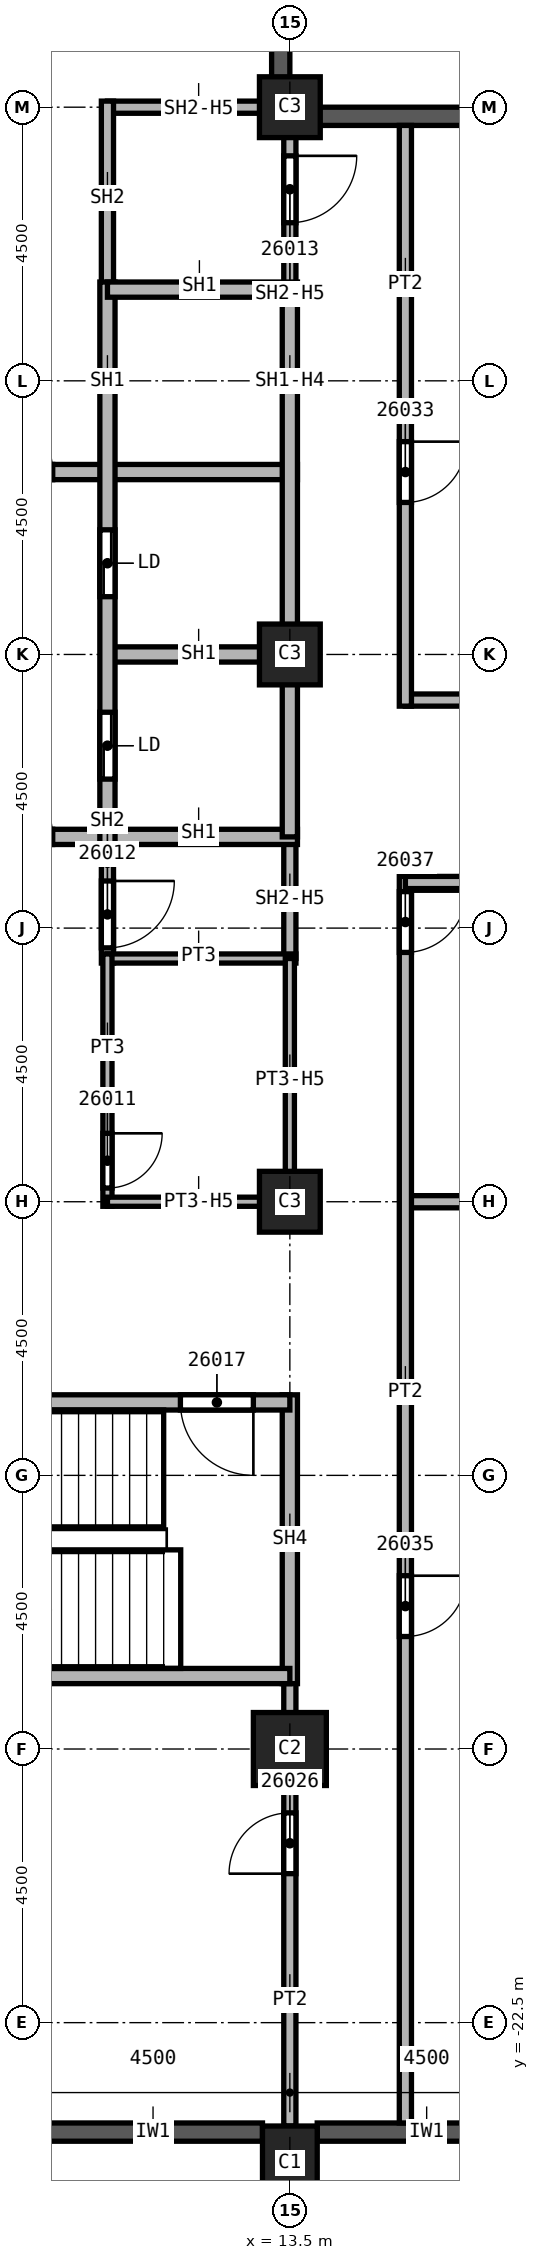
"""IFC4 building model, lengths in metres.
Left out: names, types, materials, properties, quantities, classifications, styles, units other than length and angle.
Written with IfcOpenShell. Run it as: python <this file> out.ifc"""

import sys

from ifc_helpers import new_model, si_unit, direction, frame, frame_2d, origin, origin_2d, place, context, subcontext, project, spatial, rectangle, extrude, element, fill, save


model = new_model("IFC4")
c1 = context("Model", 3, precision=1e-05, world=origin(), true_north=direction((0.0, 1.0)))
c2 = subcontext(c1, "Body", "Model", "MODEL_VIEW")
j1 = project(units=[si_unit("LENGTHUNIT", "METRE"), si_unit("PLANEANGLEUNIT", "RADIAN")], contexts=[c1])
p1 = place(None, origin())
s1 = spatial("IfcSite", under=j1, at=p1, CompositionType="ELEMENT")
p2 = place(p1, origin())
s2 = spatial("IfcBuilding", under=s1, at=p2, CompositionType="ELEMENT")
p3 = place(p2, frame((0.0, 0.0, 120.0)))
s3 = spatial("IfcBuildingStorey", under=s2, at=p3, CompositionType="ELEMENT", Elevation=120.0)
p4 = place(p3, frame((13.5, -18.0, 0.0), z_axis=(0.0, 0.0, 1.0), x_axis=(1.0, 0.0, 0.0)))
e1 = element("IfcColumn", 1, at=p4, inside=s3, PredefinedType="COLUMN", context=c2, shape_type="SweptSolid", body=[
    extrude(rectangle(XDim=1.2, YDim=1.2, at=origin_2d()), origin(), (0.0, 0.0, 1.0), 5.7),
])
for number, where, z_axis, x_axis in (
    (2, (13.5, 0.0, 0.0), (0.0, 0.0, 1.0), (1.0, 0.0, 0.0)),
    (3, (13.5, 9.0, 0.0), (0.0, 0.0, 1.0), (1.0, 0.0, 0.0)),
    (4, (13.5, -9.0, 0.0), (0.0, 0.0, 1.0), (1.0, 0.0, 0.0)),
):
    element("IfcColumn", number, at=place(p3, frame(where, z_axis=z_axis, x_axis=x_axis)), inside=s3, PredefinedType="COLUMN", context=c2, shape_type="SweptSolid", body=[
        extrude(rectangle(XDim=1.0, YDim=1.0, at=origin_2d()), origin(), (0.0, 0.0, 1.0), 5.7),
    ])
p5 = place(p3, frame((13.5, -24.8, 0.0), z_axis=(0.0, 0.206004144013, 0.978551119078), x_axis=(-1.0, 0.0, 0.0)))
e5 = element("IfcColumn", 5, at=p5, inside=s3, PredefinedType="COLUMN", context=c2, shape_type="SweptSolid", body=[
    extrude(rectangle(XDim=0.9, YDim=1.2, at=origin_2d()), origin(), (0.0, 0.0, 1.0), 5.825),
])
for number, where, z_axis, x_axis in (
    (6, (9.45, -24.3, 0.0), (0.0, 0.0, 1.0), (1.0, 0.0, 0.0)),
    (7, (13.95, -24.3, 0.0), (0.0, 0.0, 1.0), (1.0, 0.0, 0.0)),
):
    element("IfcWall", number, at=place(p3, frame(where, z_axis=z_axis, x_axis=x_axis)), inside=s3, PredefinedType="SOLIDWALL", context=c2, shape_type="SweptSolid", body=[
        extrude(rectangle(XDim=3.6, YDim=0.3, at=frame_2d((1.8, 0.0))), origin(), (0.0, 0.0, 1.0), 5.1),
    ])
p6 = place(p3, frame((13.35, 17.4, 0.0), z_axis=(0.0, 0.0, 1.0), x_axis=(0.0, -1.0, 0.0)))
e8 = element("IfcWall", 8, at=p6, inside=s3, PredefinedType="SOLIDWALL", context=c2, shape_type="SweptSolid", body=[
    extrude(rectangle(XDim=8.35, YDim=0.3, at=frame_2d((4.175, 0.0))), origin(), (0.0, 0.0, 1.0), 5.1),
])
p7 = place(p6, frame((3.35, 0.0, 0.0)))
e9 = element("IfcOpeningElement", 9, at=p7, cuts=e8, PredefinedType="OPENING", context=c2, shape_type="SweptSolid", body=[
    extrude(rectangle(XDim=1.2, YDim=2.4, at=frame_2d((0.6, 1.2))), frame((0.0, 0.15, 0.0), z_axis=(0.0, -1.0, 0.0), x_axis=(1.0, 0.0, 0.0)), (0.0, 0.0, 1.0), 0.3),
])
p8 = place(p3, frame((21.9, 8.85, 0.0), z_axis=(0.0, 0.0, 1.0), x_axis=(-1.0, 0.0, 0.0)))
e10 = element("IfcWall", 10, at=p8, inside=s3, PredefinedType="SOLIDWALL", context=c2, shape_type="SweptSolid", body=[
    extrude(rectangle(XDim=8.35, YDim=0.3, at=frame_2d((4.175, 0.0))), origin(), (0.0, 0.0, 1.0), 5.1),
])
p9 = place(p3, frame((13.5, -24.2, 0.0), z_axis=(0.0, 0.0, 1.0), x_axis=(0.0, 1.0, 0.0)))
e11 = element("IfcWall", 11, at=p9, inside=s3, PredefinedType="PARTITIONING", context=c2, shape_type="SweptSolid", body=[
    extrude(rectangle(XDim=7.525, YDim=0.2, at=frame_2d((3.762, 0.0))), origin(), (0.0, 0.0, 1.0), 5.7),
])
p10 = place(p9, frame((4.15, 0.0, 0.0)))
e12 = element("IfcOpeningElement", 12, at=p10, cuts=e11, PredefinedType="OPENING", context=c2, shape_type="SweptSolid", body=[
    extrude(rectangle(XDim=1.0, YDim=2.1, at=frame_2d((0.5, 1.05))), frame((0.0, 0.1, 0.0), z_axis=(0.0, -1.0, 0.0), x_axis=(1.0, 0.0, 0.0)), (0.0, 0.0, 1.0), 0.2),
])
p11 = place(p3, frame((15.4, -9.0, 0.0), z_axis=(0.0, 0.0, 1.0), x_axis=(1.0, 0.0, 0.0)))
e13 = element("IfcWall", 13, at=p11, inside=s3, PredefinedType="PARTITIONING", context=c2, shape_type="SweptSolid", body=[
    extrude(rectangle(XDim=11.7, YDim=0.2, at=frame_2d((5.85, 0.0))), origin(), (0.0, 0.0, 1.0), 5.7),
])
p12 = place(p3, frame((15.4, -3.65, 0.0), z_axis=(0.0, 0.0, 1.0), x_axis=(0.0, -1.0, 0.0)))
e14 = element("IfcWall", 14, at=p12, inside=s3, PredefinedType="PARTITIONING", context=c2, shape_type="SweptSolid", body=[
    extrude(rectangle(XDim=20.5, YDim=0.2, at=frame_2d((10.25, 0.0))), origin(), (0.0, 0.0, 1.0), 5.7),
])
p13 = place(p12, frame((11.5, 0.0, 0.0)))
e15 = element("IfcOpeningElement", 15, at=p13, cuts=e14, PredefinedType="OPENING", context=c2, shape_type="SweptSolid", body=[
    extrude(rectangle(XDim=1.0, YDim=2.1, at=frame_2d((0.5, 1.05))), frame((0.0, 0.1, 0.0), z_axis=(0.0, -1.0, 0.0), x_axis=(1.0, 0.0, 0.0)), (0.0, 0.0, 1.0), 0.2),
])
p14 = place(p12, frame((0.25, 0.0, 0.0)))
e16 = element("IfcOpeningElement", 16, at=p14, cuts=e14, PredefinedType="OPENING", context=c2, shape_type="SweptSolid", body=[
    extrude(rectangle(XDim=1.0, YDim=2.1, at=frame_2d((0.5, 1.05))), frame((0.0, 0.1, 0.0), z_axis=(0.0, -1.0, 0.0), x_axis=(1.0, 0.0, 0.0)), (0.0, 0.0, 1.0), 0.2),
])
p15 = place(p3, frame((15.4, -0.75, 0.0), z_axis=(0.0, 0.0, 1.0), x_axis=(1.0, 0.0, 0.0)))
e17 = element("IfcWall", 17, at=p15, inside=s3, PredefinedType="PARTITIONING", context=c2, shape_type="SweptSolid", body=[
    extrude(rectangle(XDim=18.45, YDim=0.2, at=frame_2d((9.225, 0.0))), origin(), (0.0, 0.0, 1.0), 5.7),
])
p16 = place(p15, frame((12.5, 0.0, 0.0)))
e18 = element("IfcOpeningElement", 18, at=p16, cuts=e17, PredefinedType="OPENING", context=c2, shape_type="SweptSolid", body=[
    extrude(rectangle(XDim=1.0, YDim=2.1, at=frame_2d((0.5, 1.05))), frame((0.0, 0.1, 0.0), z_axis=(0.0, -1.0, 0.0), x_axis=(1.0, 0.0, 0.0)), (0.0, 0.0, 1.0), 0.2),
])
p17 = place(p3, frame((15.4, 8.7, 0.0), z_axis=(0.0, 0.0, 1.0), x_axis=(0.0, -1.0, 0.0)))
e19 = element("IfcWall", 19, at=p17, inside=s3, PredefinedType="PARTITIONING", context=c2, shape_type="SweptSolid", body=[
    extrude(rectangle(XDim=9.55, YDim=0.2, at=frame_2d((4.775, 0.0))), origin(), (0.0, 0.0, 1.0), 5.7),
])
p18 = place(p17, frame((5.2, 0.0, 0.0)))
e20 = element("IfcOpeningElement", 20, at=p18, cuts=e19, PredefinedType="OPENING", context=c2, shape_type="SweptSolid", body=[
    extrude(rectangle(XDim=1.0, YDim=2.1, at=frame_2d((0.5, 1.05))), frame((0.0, 0.1, 0.0), z_axis=(0.0, -1.0, 0.0), x_axis=(1.0, 0.0, 0.0)), (0.0, 0.0, 1.0), 0.2),
])
p19 = place(p3, frame((33.85, -3.75, 0.0), z_axis=(0.0, 0.0, 1.0), x_axis=(-1.0, 0.0, 0.0)))
e21 = element("IfcWall", 21, at=p19, inside=s3, PredefinedType="PARTITIONING", context=c2, shape_type="SweptSolid", body=[
    extrude(rectangle(XDim=18.45, YDim=0.2, at=frame_2d((9.225, 0.0))), origin(), (0.0, 0.0, 1.0), 5.7),
])
p20 = place(p3, frame((10.5, -2.875, 0.0), z_axis=(0.0, 0.0, 1.0), x_axis=(0.0, -1.0, 0.0)))
e22 = element("IfcWall", 22, at=p20, inside=s3, PredefinedType="SOLIDWALL", context=c2, shape_type="SweptSolid", body=[
    extrude(rectangle(XDim=2.2, YDim=0.2, at=frame_2d((1.1, 0.0))), origin(), (0.0, 0.0, 1.0), 5.7),
])
p21 = place(p20, frame((0.85, 0.0, 0.0)))
e23 = element("IfcOpeningElement", 23, at=p21, cuts=e22, PredefinedType="OPENING", context=c2, shape_type="SweptSolid", body=[
    extrude(rectangle(XDim=1.1, YDim=2.1, at=frame_2d((0.55, 1.05))), frame((0.0, 0.1, 0.0), z_axis=(0.0, -1.0, 0.0), x_axis=(1.0, 0.0, 0.0)), (0.0, 0.0, 1.0), 0.2),
])
p22 = place(p3, frame((10.5, 9.0, 0.0), z_axis=(0.0, 0.0, 1.0), x_axis=(1.0, 0.0, 0.0)))
e24 = element("IfcWall", 24, at=p22, inside=s3, PredefinedType="SOLIDWALL", context=c2, shape_type="SweptSolid", body=[
    extrude(rectangle(XDim=3.0, YDim=0.2, at=frame_2d((1.5, 0.0))), origin(), (0.0, 0.0, 1.0), 4.938),
])
p23 = place(p3, frame((10.5, 9.1, 0.0), z_axis=(0.0, 0.0, 1.0), x_axis=(0.0, -1.0, 0.0)))
e25 = element("IfcWall", 25, at=p23, inside=s3, PredefinedType="SOLIDWALL", context=c2, shape_type="SweptSolid", body=[
    extrude(rectangle(XDim=3.225, YDim=0.2, at=frame_2d((1.613, 0.0))), origin(), (0.0, 0.0, 1.0), 5.7),
])
p24 = place(p3, frame((13.5, -3.0, 0.0), z_axis=(0.0, 0.0, 1.0), x_axis=(0.0, -1.0, 0.0)))
e26 = element("IfcWall", 26, at=p24, inside=s3, PredefinedType="SOLIDWALL", context=c2, shape_type="SweptSolid", body=[
    extrude(rectangle(XDim=2.0, YDim=0.2, at=frame_2d((1.0, 0.0))), origin(), (0.0, 0.0, 1.0), 4.938),
])
p25 = place(p3, frame((13.5, 9.05, 0.0), z_axis=(0.0, 0.0, 1.0), x_axis=(0.0, -1.0, 0.0)))
e27 = element("IfcWall", 27, at=p25, inside=s3, PredefinedType="SOLIDWALL", context=c2, shape_type="SweptSolid", body=[
    extrude(rectangle(XDim=3.05, YDim=0.2, at=frame_2d((1.525, 0.0))), origin(), (0.0, 0.0, 1.0), 4.938),
])
p26 = place(p25, frame((0.85, 0.0, 0.0)))
e28 = element("IfcOpeningElement", 28, at=p26, cuts=e27, PredefinedType="OPENING", context=c2, shape_type="SweptSolid", body=[
    extrude(rectangle(XDim=1.1, YDim=2.1, at=frame_2d((0.55, 1.05))), frame((0.0, 0.1, 0.0), z_axis=(0.0, -1.0, 0.0), x_axis=(1.0, 0.0, 0.0)), (0.0, 0.0, 1.0), 0.2),
])
p27 = place(p3, frame((4.375, 3.0, 0.0), z_axis=(0.0, 0.0, 1.0), x_axis=(1.0, 0.0, 0.0)))
e29 = element("IfcWall", 29, at=p27, inside=s3, PredefinedType="SOLIDWALL", context=c2, shape_type="SweptSolid", body=[
    extrude(rectangle(XDim=9.25, YDim=0.25, at=frame_2d((4.625, 0.0))), origin(), (0.0, 0.0, 1.0), 5.7),
])
p28 = place(p27, frame((4.125, 0.0, 0.0)))
e30 = element("IfcOpeningElement", 30, at=p28, cuts=e29, PredefinedType="OPENING", context=c2, shape_type="SweptSolid", body=[
    extrude(rectangle(XDim=1.1, YDim=2.1, at=frame_2d((0.55, 1.05))), frame((0.0, 0.125, 0.0), z_axis=(0.0, -1.0, 0.0), x_axis=(1.0, 0.0, 0.0)), (0.0, 0.0, 1.0), 0.25),
])
p29 = place(p3, frame((7.5, -3.0, 0.0), z_axis=(0.0, 0.0, 1.0), x_axis=(1.0, 0.0, 0.0)))
e31 = element("IfcWall", 31, at=p29, inside=s3, PredefinedType="SOLIDWALL", context=c2, shape_type="SweptSolid", body=[
    extrude(rectangle(XDim=6.125, YDim=0.25, at=frame_2d((3.062, 0.0))), origin(), (0.0, 0.0, 1.0), 5.7),
])
p30 = place(p29, frame((1.0, 0.0, 0.0)))
e32 = element("IfcOpeningElement", 32, at=p30, cuts=e31, PredefinedType="OPENING", context=c2, shape_type="SweptSolid", body=[
    extrude(rectangle(XDim=1.1, YDim=2.1, at=frame_2d((0.55, 1.05))), frame((0.0, 0.125, 0.0), z_axis=(0.0, -1.0, 0.0), x_axis=(1.0, 0.0, 0.0)), (0.0, 0.0, 1.0), 0.25),
])
p31 = place(p3, frame((10.5, 0.0, 0.0), z_axis=(0.0, 0.0, 1.0), x_axis=(1.0, 0.0, 0.0)))
e33 = element("IfcWall", 33, at=p31, inside=s3, PredefinedType="SOLIDWALL", context=c2, shape_type="SweptSolid", body=[
    extrude(rectangle(XDim=3.125, YDim=0.25, at=frame_2d((1.562, 0.0))), origin(), (0.0, 0.0, 1.0), 5.7),
])
p32 = place(p3, frame((10.5, 6.125, 0.0), z_axis=(0.0, 0.0, 1.0), x_axis=(0.0, -1.0, 0.0)))
e34 = element("IfcWall", 34, at=p32, inside=s3, PredefinedType="SOLIDWALL", context=c2, shape_type="SweptSolid", body=[
    extrude(rectangle(XDim=9.25, YDim=0.25, at=frame_2d((4.625, 0.0))), origin(), (0.0, 0.0, 1.0), 5.7),
])
p33 = place(p32, frame((7.075, 0.0, 0.0)))
e35 = element("IfcOpeningElement", 35, at=p33, cuts=e34, PredefinedType="OPENING", context=c2, shape_type="SweptSolid", body=[
    extrude(rectangle(XDim=1.1, YDim=2.1, at=frame_2d((0.55, 1.05))), frame((0.0, 0.125, 0.0), z_axis=(0.0, -1.0, 0.0), x_axis=(1.0, 0.0, 0.0)), (0.0, 0.0, 1.0), 0.25),
])
p34 = place(p32, frame((4.075, 0.0, 0.0)))
e36 = element("IfcOpeningElement", 36, at=p34, cuts=e34, PredefinedType="OPENING", context=c2, shape_type="SweptSolid", body=[
    extrude(rectangle(XDim=1.1, YDim=2.1, at=frame_2d((0.55, 1.05))), frame((0.0, 0.125, 0.0), z_axis=(0.0, -1.0, 0.0), x_axis=(1.0, 0.0, 0.0)), (0.0, 0.0, 1.0), 0.25),
])
p35 = place(p3, frame((10.5, 6.0, 0.0), z_axis=(0.0, 0.0, 1.0), x_axis=(1.0, 0.0, 0.0)))
e37 = element("IfcWall", 37, at=p35, inside=s3, PredefinedType="SOLIDWALL", context=c2, shape_type="SweptSolid", body=[
    extrude(rectangle(XDim=3.125, YDim=0.25, at=frame_2d((1.562, 0.0))), origin(), (0.0, 0.0, 1.0), 5.7),
])
p36 = place(p3, frame((13.5, 6.0, 0.0), z_axis=(0.0, 0.0, 1.0), x_axis=(0.0, -1.0, 0.0)))
e38 = element("IfcWall", 38, at=p36, inside=s3, PredefinedType="SOLIDWALL", context=c2, shape_type="SweptSolid", body=[
    extrude(rectangle(XDim=9.0, YDim=0.25, at=frame_2d((4.5, 0.0))), origin(), (0.0, 0.0, 1.0), 4.938),
])
p37 = place(p3, frame((13.5, -16.925, 0.0), z_axis=(0.0, 0.0, 1.0), x_axis=(0.0, 1.0, 0.0)))
e39 = element("IfcWall", 39, at=p37, inside=s3, PredefinedType="SOLIDWALL", context=c2, shape_type="SweptSolid", body=[
    extrude(rectangle(XDim=4.75, YDim=0.25, at=frame_2d((2.375, 0.0))), origin(), (0.0, 0.0, 1.0), 5.7),
])
p38 = place(p3, frame((13.5, -16.8, 0.0), z_axis=(0.0, 0.0, 1.0), x_axis=(-1.0, 0.0, 0.0)))
e40 = element("IfcWall", 40, at=p38, inside=s3, PredefinedType="SOLIDWALL", context=c2, shape_type="SweptSolid", body=[
    extrude(rectangle(XDim=9.125, YDim=0.25, at=frame_2d((4.562, 0.0))), origin(), (0.0, 0.0, 1.0), 5.7),
])
p39 = place(p3, frame((13.5, -12.3, 0.0), z_axis=(0.0, 0.0, 1.0), x_axis=(-1.0, 0.0, 0.0)))
e41 = element("IfcWall", 41, at=p39, inside=s3, PredefinedType="SOLIDWALL", context=c2, shape_type="SweptSolid", body=[
    extrude(rectangle(XDim=9.125, YDim=0.25, at=frame_2d((4.562, 0.0))), origin(), (0.0, 0.0, 1.0), 5.7),
])
p40 = place(p39, frame((0.6, 0.0, 0.0)))
e42 = element("IfcOpeningElement", 42, at=p40, cuts=e41, PredefinedType="OPENING", context=c2, shape_type="SweptSolid", body=[
    extrude(rectangle(XDim=1.2, YDim=2.1, at=frame_2d((0.6, 1.05))), frame((0.0, 0.125, 0.0), z_axis=(0.0, -1.0, 0.0), x_axis=(1.0, 0.0, 0.0)), (0.0, 0.0, 1.0), 0.25),
])
p41 = place(p3, frame((10.5, -5.0, 0.0), z_axis=(0.0, 0.0, 1.0), x_axis=(1.0, 0.0, 0.0)))
e43 = element("IfcWall", 43, at=p41, inside=s3, PredefinedType="PARTITIONING", context=c2, shape_type="SweptSolid", body=[
    extrude(rectangle(XDim=3.1, YDim=0.15, at=frame_2d((1.55, 0.0))), origin(), (0.0, 0.0, 1.0), 5.7),
])
p42 = place(p3, frame((10.5, -4.925, 0.0), z_axis=(0.0, 0.0, 1.0), x_axis=(0.0, -1.0, 0.0)))
e44 = element("IfcWall", 44, at=p42, inside=s3, PredefinedType="PARTITIONING", context=c2, shape_type="SweptSolid", body=[
    extrude(rectangle(XDim=4.15, YDim=0.15, at=frame_2d((2.075, 0.0))), origin(), (0.0, 0.0, 1.0), 5.7),
])
p43 = place(p42, frame((2.95, 0.0, 0.0)))
e45 = element("IfcOpeningElement", 45, at=p43, cuts=e44, PredefinedType="OPENING", context=c2, shape_type="SweptSolid", body=[
    extrude(rectangle(XDim=0.9, YDim=2.1, at=frame_2d((0.45, 1.05))), frame((0.0, 0.075, 0.0), z_axis=(0.0, -1.0, 0.0), x_axis=(1.0, 0.0, 0.0)), (0.0, 0.0, 1.0), 0.15),
])
p44 = place(p3, frame((13.5, -9.0, 0.0), z_axis=(0.0, 0.0, 1.0), x_axis=(-1.0, 0.0, 0.0)))
e46 = element("IfcWall", 46, at=p44, inside=s3, PredefinedType="PARTITIONING", context=c2, shape_type="SweptSolid", body=[
    extrude(rectangle(XDim=3.0, YDim=0.15, at=frame_2d((1.5, 0.0))), origin(), (0.0, 0.0, 1.0), 4.938),
])
p45 = place(p3, frame((13.5, -5.0, 0.0), z_axis=(0.0, 0.0, 1.0), x_axis=(0.0, -1.0, 0.0)))
e47 = element("IfcWall", 47, at=p45, inside=s3, PredefinedType="PARTITIONING", context=c2, shape_type="SweptSolid", body=[
    extrude(rectangle(XDim=4.075, YDim=0.15, at=frame_2d((2.038, 0.0))), origin(), (0.0, 0.0, 1.0), 4.938),
])
p46 = place(p43, origin())
e48 = element("IfcDoor", 48, at=p46, inside=s3, OperationType="SINGLE_SWING_RIGHT", PredefinedType="DOOR", context=c2, shape_type="SweptSolid", body=[
    extrude(rectangle(XDim=0.9, YDim=2.1, at=frame_2d((0.45, 1.05))), frame((0.0, 0.025, 0.0), z_axis=(0.0, -1.0, 0.0), x_axis=(1.0, 0.0, 0.0)), (0.0, 0.0, 1.0), 0.05),
])
fill(e45, e48)
p47 = place(p21, origin())
e49 = element("IfcDoor", 49, at=p47, inside=s3, OperationType="SINGLE_SWING_LEFT", PredefinedType="DOOR", context=c2, shape_type="SweptSolid", body=[
    extrude(rectangle(XDim=1.1, YDim=2.1, at=frame_2d((0.55, 1.05))), frame((0.0, 0.025, 0.0), z_axis=(0.0, -1.0, 0.0), x_axis=(1.0, 0.0, 0.0)), (0.0, 0.0, 1.0), 0.05),
])
fill(e23, e49)
p48 = place(p26, origin())
e50 = element("IfcDoor", 50, at=p48, inside=s3, OperationType="SINGLE_SWING_RIGHT", PredefinedType="DOOR", context=c2, shape_type="SweptSolid", body=[
    extrude(rectangle(XDim=1.1, YDim=2.1, at=frame_2d((0.55, 1.05))), frame((0.0, 0.025, 0.0), z_axis=(0.0, -1.0, 0.0), x_axis=(1.0, 0.0, 0.0)), (0.0, 0.0, 1.0), 0.05),
])
fill(e28, e50)
p49 = place(p40, origin())
e51 = element("IfcDoor", 51, at=p49, inside=s3, OperationType="SINGLE_SWING_RIGHT", PredefinedType="DOOR", context=c2, shape_type="SweptSolid", body=[
    extrude(rectangle(XDim=1.2, YDim=2.1, at=frame_2d((0.6, 1.05))), frame((0.0, 0.025, 0.0), z_axis=(0.0, -1.0, 0.0), x_axis=(1.0, 0.0, 0.0)), (0.0, 0.0, 1.0), 0.05),
])
fill(e42, e51)
p50 = place(p10, origin())
e52 = element("IfcDoor", 52, at=p50, inside=s3, OperationType="SINGLE_SWING_LEFT", PredefinedType="DOOR", context=c2, shape_type="SweptSolid", body=[
    extrude(rectangle(XDim=1.0, YDim=2.1, at=frame_2d((0.5, 1.05))), frame((0.0, 0.025, 0.0), z_axis=(0.0, -1.0, 0.0), x_axis=(1.0, 0.0, 0.0)), (0.0, 0.0, 1.0), 0.05),
])
fill(e12, e52)
p51 = place(p18, origin())
e53 = element("IfcDoor", 53, at=p51, inside=s3, OperationType="SINGLE_SWING_RIGHT", PredefinedType="DOOR", context=c2, shape_type="SweptSolid", body=[
    extrude(rectangle(XDim=1.0, YDim=2.1, at=frame_2d((0.5, 1.05))), frame((0.0, 0.025, 0.0), z_axis=(0.0, -1.0, 0.0), x_axis=(1.0, 0.0, 0.0)), (0.0, 0.0, 1.0), 0.05),
])
fill(e20, e53)
p52 = place(p13, origin())
e54 = element("IfcDoor", 54, at=p52, inside=s3, OperationType="SINGLE_SWING_RIGHT", PredefinedType="DOOR", context=c2, shape_type="SweptSolid", body=[
    extrude(rectangle(XDim=1.0, YDim=2.1, at=frame_2d((0.5, 1.05))), frame((0.0, 0.025, 0.0), z_axis=(0.0, -1.0, 0.0), x_axis=(1.0, 0.0, 0.0)), (0.0, 0.0, 1.0), 0.05),
])
fill(e15, e54)
p53 = place(p14, origin())
e55 = element("IfcDoor", 55, at=p53, inside=s3, OperationType="SINGLE_SWING_RIGHT", PredefinedType="DOOR", context=c2, shape_type="SweptSolid", body=[
    extrude(rectangle(XDim=1.0, YDim=2.1, at=frame_2d((0.5, 1.05))), frame((0.0, 0.025, 0.0), z_axis=(0.0, -1.0, 0.0), x_axis=(1.0, 0.0, 0.0)), (0.0, 0.0, 1.0), 0.05),
])
fill(e16, e55)
p54 = place(p33, origin())
e56 = element("IfcDoor", 56, at=p54, inside=s3, OperationType="SLIDING_TO_LEFT", PredefinedType="DOOR", context=c2, shape_type="SweptSolid", body=[
    extrude(rectangle(XDim=1.1, YDim=2.1, at=frame_2d((0.55, 1.05))), frame((0.0, 0.025, 0.0), z_axis=(0.0, -1.0, 0.0), x_axis=(1.0, 0.0, 0.0)), (0.0, 0.0, 1.0), 0.05),
])
fill(e35, e56)
p55 = place(p34, origin())
e57 = element("IfcDoor", 57, at=p55, inside=s3, OperationType="SLIDING_TO_LEFT", PredefinedType="DOOR", context=c2, shape_type="SweptSolid", body=[
    extrude(rectangle(XDim=1.1, YDim=2.1, at=frame_2d((0.55, 1.05))), frame((0.0, 0.025, 0.0), z_axis=(0.0, -1.0, 0.0), x_axis=(1.0, 0.0, 0.0)), (0.0, 0.0, 1.0), 0.05),
])
fill(e36, e57)
save(model, sys.argv[1])
